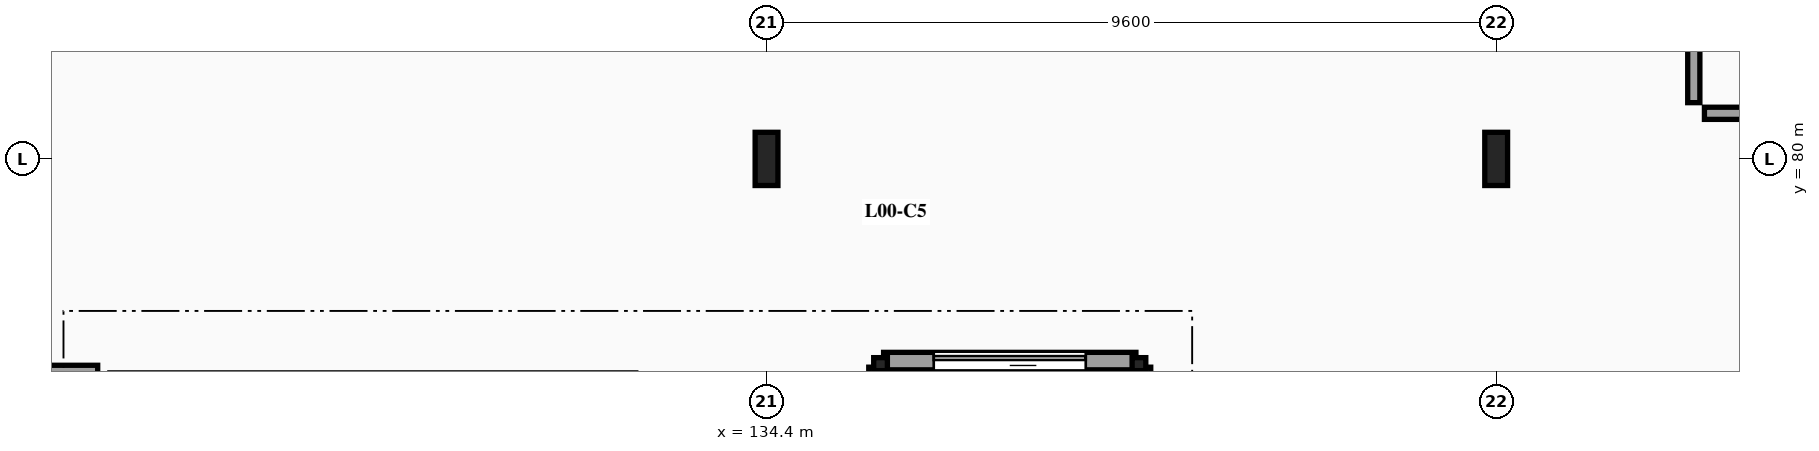
"""IFC4 building model, lengths in metres.
Left out: names, types, materials, properties, quantities, classifications, styles, units other than length and angle.
Written with IfcOpenShell. Run it as: python <this file> out.ifc"""

import sys

from ifc_helpers import new_model, si_unit, direction, frame, frame_2d, origin, origin_2d, place, context, subcontext, project, spatial, rectangle, i_section, extrude, element, fill, save


model = new_model("IFC4")
c1 = context("Model", 3, precision=1e-05, world=origin(), true_north=direction((0.0, 1.0)))
c2 = subcontext(c1, "Body", "Model", "MODEL_VIEW")
j1 = project(units=[si_unit("LENGTHUNIT", "METRE"), si_unit("PLANEANGLEUNIT", "RADIAN")], contexts=[c1])
p1 = place(None, origin())
s1 = spatial("IfcSite", under=j1, at=p1, CompositionType="ELEMENT")
p2 = place(p1, origin())
s2 = spatial("IfcBuilding", under=s1, at=p2, CompositionType="ELEMENT")
p3 = place(p2, origin())
s3 = spatial("IfcBuildingStorey", under=s2, at=p3, CompositionType="ELEMENT", Elevation=0.0)
for number, where, z_axis, x_axis in (
    (1, (134.4, 80.0, -0.28), (0.0, 0.0, 1.0), (1.0, 0.0, 0.0)),
    (2, (144.0, 80.0, -0.28), (0.0, 0.0, 1.0), (1.0, 0.0, 0.0)),
):
    element("IfcColumn", number, at=place(p3, frame(where, z_axis=z_axis, x_axis=x_axis)), inside=s3, PredefinedType="COLUMN", context=c2, shape_type="SweptSolid", body=[
        extrude(i_section(OverallWidth=0.3, OverallDepth=0.7, WebThickness=0.017, FlangeThickness=0.032, FilletRadius=0.027, at=origin_2d()), origin(), (0.0, 0.0, 1.0), 4.52),
    ])
for number, where, z_axis, x_axis in (
    (3, (139.3, 77.3, 0.0), (0.0, 0.0, 1.0), (1.0, 0.0, 0.0)),
    (4, (135.9, 77.3, 0.0), (0.0, 0.0, 1.0), (1.0, 0.0, 0.0)),
):
    element("IfcColumn", number, at=place(p3, frame(where, z_axis=z_axis, x_axis=x_axis)), inside=s3, PredefinedType="COLUMN", context=c2, shape_type="SweptSolid", body=[
        extrude(i_section(OverallWidth=0.18, OverallDepth=0.171, WebThickness=0.006, FlangeThickness=0.01, FilletRadius=0.015, at=origin_2d()), origin(), (0.0, 0.0, 1.0), 4.5),
    ])
p4 = place(p3, frame((123.6, 77.2, 0.0), z_axis=(0.0, 0.0, 1.0), x_axis=(1.0, 0.0, 0.0)))
e5 = element("IfcWall", 5, at=p4, inside=s3, PredefinedType="SOLIDWALL", context=c2, shape_type="SweptSolid", body=[
    extrude(rectangle(XDim=2.0, YDim=0.17, at=frame_2d((1.0, 0.0))), origin(), (0.0, 0.0, 1.0), 3.6),
])
p5 = place(p3, frame((135.94, 77.34, 0.0), z_axis=(0.0, 0.0, 1.0), x_axis=(1.0, 0.0, 0.0)))
e6 = element("IfcWall", 6, at=p5, inside=s3, PredefinedType="SOLIDWALL", context=c2, shape_type="SweptSolid", body=[
    extrude(rectangle(XDim=3.32, YDim=0.23, at=frame_2d((1.66, 0.0))), origin(), (0.0, 0.0, 1.0), 3.6),
])
p6 = place(p5, frame((0.66, 0.0, 0.0)))
e7 = element("IfcOpeningElement", 7, at=p6, cuts=e6, PredefinedType="OPENING", context=c2, shape_type="SweptSolid", body=[
    extrude(rectangle(XDim=2.0, YDim=2.5, at=frame_2d((1.0, 1.25))), frame((0.0, 0.125, 0.0), z_axis=(0.0, -1.0, 0.0), x_axis=(1.0, 0.0, 0.0)), (0.0, 0.0, 1.0), 0.25),
])
for number, where, z_axis, x_axis in (
    (8, (135.86, 73.14, 0.0), (0.0, 0.0, 1.0), (0.0, 1.0, 0.0)),
    (9, (139.34, 73.14, 0.0), (0.0, 0.0, 1.0), (0.0, 1.0, 0.0)),
):
    element("IfcWall", number, at=place(p3, frame(where, z_axis=z_axis, x_axis=x_axis)), inside=s3, PredefinedType="SOLIDWALL", context=c2, shape_type="SweptSolid", body=[
        extrude(rectangle(XDim=4.12, YDim=0.23, at=frame_2d((2.06, 0.0))), origin(), (0.0, 0.0, 1.0), 3.6),
    ])
p7 = place(p3, frame((146.74, 80.6, 0.0), z_axis=(0.0, 0.0, 1.0), x_axis=(1.0, 0.0, 0.0)))
e10 = element("IfcWall", 10, at=p7, inside=s3, PredefinedType="PARTITIONING", context=c2, shape_type="SweptSolid", body=[
    extrude(rectangle(XDim=25.32, YDim=0.16, at=frame_2d((12.66, 0.0))), origin(), (0.0, 0.0, 1.0), 3.6),
])
p8 = place(p7, frame((20.446, 0.0, 0.0)))
e11 = element("IfcOpeningElement", 11, at=p8, cuts=e10, PredefinedType="OPENING", context=c2, shape_type="SweptSolid", body=[
    extrude(rectangle(XDim=1.55, YDim=2.3, at=frame_2d((0.775, 1.15))), frame((0.0, 0.09, 0.0), z_axis=(0.0, -1.0, 0.0), x_axis=(1.0, 0.0, 0.0)), (0.0, 0.0, 1.0), 0.18),
])
p9 = place(p3, frame((146.6, 80.74, 0.0), z_axis=(0.0, 0.0, 1.0), x_axis=(0.0, 1.0, 0.0)))
e12 = element("IfcWall", 12, at=p9, inside=s3, PredefinedType="PARTITIONING", context=c2, shape_type="SweptSolid", body=[
    extrude(rectangle(XDim=15.09, YDim=0.16, at=frame_2d((7.545, 0.0))), origin(), (0.0, 0.0, 1.0), 3.6),
])
p10 = place(p6, origin())
e13 = element("IfcDoor", 13, at=p10, inside=s3, OperationType="SLIDING_TO_RIGHT", PredefinedType="DOOR", context=c2, shape_type="SweptSolid", body=[
    extrude(rectangle(XDim=2.0, YDim=2.5, at=frame_2d((1.0, 1.25))), frame((0.0, 0.025, 0.0), z_axis=(0.0, -1.0, 0.0), x_axis=(1.0, 0.0, 0.0)), (0.0, 0.0, 1.0), 0.05),
])
fill(e7, e13)
save(model, sys.argv[1])
